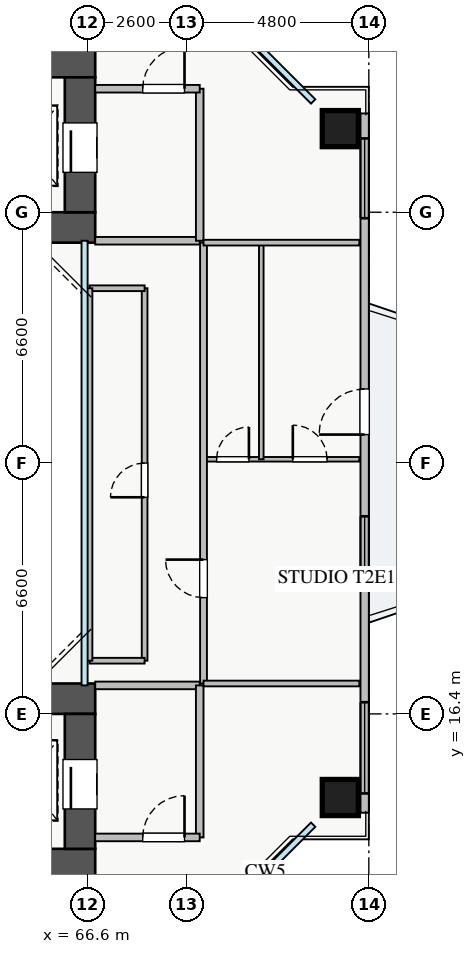
"""IFC4 building model, lengths in metres.
Left out: names, types, materials, properties, quantities, classifications, styles, units other than length and angle.
Written with IfcOpenShell. Run it as: python <this file> out.ifc"""

import sys

from ifc_helpers import new_model, si_unit, direction, frame, frame_2d, origin, origin_2d, place, context, subcontext, project, spatial, rectangle, extrude, source, transform, mapped, element, fill, save


model = new_model("IFC4")
c1 = context("Model", 3, precision=1e-05, world=origin(), true_north=direction((0.0, 1.0)))
c2 = subcontext(c1, "Body", "Model", "MODEL_VIEW")
j1 = project(units=[si_unit("LENGTHUNIT", "METRE"), si_unit("PLANEANGLEUNIT", "RADIAN")], contexts=[c1])
p1 = place(None, origin())
s1 = spatial("IfcSite", under=j1, at=p1, CompositionType="ELEMENT")
p2 = place(p1, origin())
s2 = spatial("IfcBuilding", under=s1, at=p2, CompositionType="ELEMENT")
p3 = place(p2, frame((0.0, 0.0, 29.5)))
s3 = spatial("IfcBuildingStorey", under=s2, at=p3, CompositionType="ELEMENT", Elevation=29.5)
p4 = place(p3, frame((54.2, 29.2, 0.0), z_axis=(0.0, 0.0, 1.0), x_axis=(1.0, 0.0, 0.0)))
e1 = element("IfcWall", 1, at=p4, inside=s3, PredefinedType="SHEAR", context=c2, shape_type="SweptSolid", body=[
    extrude(rectangle(XDim=12.6, YDim=0.8, at=frame_2d((6.3, 0.0))), origin(), (0.0, 0.0, 1.0), 3.25),
])
p5 = place(p3, frame((54.2, 33.55, 0.0), z_axis=(0.0, 0.0, 1.0), x_axis=(1.0, 0.0, 0.0)))
e2 = element("IfcWall", 2, at=p5, inside=s3, PredefinedType="SHEAR", context=c2, shape_type="SweptSolid", body=[
    extrude(rectangle(XDim=12.6, YDim=0.8, at=frame_2d((6.3, 0.0))), origin(), (0.0, 0.0, 1.0), 3.25),
])
p6 = place(p5, frame((8.2, 0.0, 0.0)))
e3 = element("IfcOpeningElement", 3, at=p6, cuts=e2, PredefinedType="OPENING", context=c2, shape_type="SweptSolid", body=[
    extrude(rectangle(XDim=1.1, YDim=2.05, at=frame_2d((0.55, 1.025))), frame((0.0, 0.41, 0.0), z_axis=(0.0, -1.0, 0.0), x_axis=(1.0, 0.0, 0.0)), (0.0, 0.0, 1.0), 0.82),
])
p7 = place(p3, frame((66.4, 29.6, 0.0), z_axis=(0.0, 0.0, 1.0), x_axis=(0.0, 1.0, 0.0)))
e4 = element("IfcWall", 4, at=p7, inside=s3, PredefinedType="SHEAR", context=c2, shape_type="SweptSolid", body=[
    extrude(rectangle(XDim=3.55, YDim=0.8, at=frame_2d((1.775, 0.0))), origin(), (0.0, 0.0, 1.0), 3.25),
])
p8 = place(p7, frame((1.05, 0.0, 0.0)))
e5 = element("IfcOpeningElement", 5, at=p8, cuts=e4, PredefinedType="OPENING", context=c2, shape_type="SweptSolid", body=[
    extrude(rectangle(XDim=1.3, YDim=2.05, at=frame_2d((0.65, 1.025))), frame((0.0, 0.41, 0.0), z_axis=(0.0, -1.0, 0.0), x_axis=(1.0, 0.0, 0.0)), (0.0, 0.0, 1.0), 0.82),
])
p9 = place(p3, frame((54.2, 12.45, 0.0), z_axis=(0.0, 0.0, 1.0), x_axis=(1.0, 0.0, 0.0)))
e6 = element("IfcWall", 6, at=p9, inside=s3, PredefinedType="SHEAR", context=c2, shape_type="SweptSolid", body=[
    extrude(rectangle(XDim=12.6, YDim=0.8, at=frame_2d((6.3, 0.0))), origin(), (0.0, 0.0, 1.0), 3.25),
])
p10 = place(p9, frame((8.2, 0.0, 0.0)))
e7 = element("IfcOpeningElement", 7, at=p10, cuts=e6, PredefinedType="OPENING", context=c2, shape_type="SweptSolid", body=[
    extrude(rectangle(XDim=1.1, YDim=2.05, at=frame_2d((0.55, 1.025))), frame((0.0, 0.41, 0.0), z_axis=(0.0, -1.0, 0.0), x_axis=(1.0, 0.0, 0.0)), (0.0, 0.0, 1.0), 0.82),
])
p11 = place(p3, frame((54.2, 16.8, 0.0), z_axis=(0.0, 0.0, 1.0), x_axis=(1.0, 0.0, 0.0)))
e8 = element("IfcWall", 8, at=p11, inside=s3, PredefinedType="SHEAR", context=c2, shape_type="SweptSolid", body=[
    extrude(rectangle(XDim=12.6, YDim=0.8, at=frame_2d((6.3, 0.0))), origin(), (0.0, 0.0, 1.0), 3.25),
])
p12 = place(p3, frame((66.4, 12.85, 0.0), z_axis=(0.0, 0.0, 1.0), x_axis=(0.0, 1.0, 0.0)))
e9 = element("IfcWall", 9, at=p12, inside=s3, PredefinedType="SHEAR", context=c2, shape_type="SweptSolid", body=[
    extrude(rectangle(XDim=3.55, YDim=0.8, at=frame_2d((1.775, 0.0))), origin(), (0.0, 0.0, 1.0), 3.25),
])
p13 = place(p12, frame((1.05, 0.0, 0.0)))
e10 = element("IfcOpeningElement", 10, at=p13, cuts=e9, PredefinedType="OPENING", context=c2, shape_type="SweptSolid", body=[
    extrude(rectangle(XDim=1.3, YDim=2.05, at=frame_2d((0.65, 1.025))), frame((0.0, 0.41, 0.0), z_axis=(0.0, -1.0, 0.0), x_axis=(1.0, 0.0, 0.0)), (0.0, 0.0, 1.0), 0.82),
])
m1 = source(origin(), c2, "Body", "SweptSolid", [
    extrude(rectangle(XDim=0.95, YDim=0.95, at=origin_2d()), origin(), (0.0, 0.0, 1.0), 3.25),
])
for number, where, z_axis, x_axis in (
    (11, (73.25, 14.2, 0.0), (0.0, 0.0, 1.0), (1.0, 0.0, 0.0)),
    (12, (73.25, 31.8, 0.0), (0.0, 0.0, 1.0), (1.0, 0.0, 0.0)),
):
    element("IfcColumn", number, at=place(p3, frame(where, z_axis=z_axis, x_axis=x_axis)), inside=s3, PredefinedType="COLUMN", context=c2, shape_type="MappedRepresentation", body=[
        mapped(m1, transform((0.0, 0.0, 0.0), x_axis=(1.0, 0.0, 0.0), y_axis=(0.0, 1.0, 0.0), z_axis=(0.0, 0.0, 1.0), scale=1.0)),
    ])
p14 = place(p3, frame((73.89, 13.8, 0.0), z_axis=(0.0, 0.0, 1.0), x_axis=(0.0, 1.0, 0.0)))
e13 = element("IfcWall", 13, at=p14, inside=s3, PredefinedType="STANDARD", context=c2, shape_type="SweptSolid", body=[
    extrude(rectangle(XDim=18.4, YDim=0.22, at=frame_2d((9.2, 0.0))), origin(), (0.0, 0.0, 1.0), 2.61),
])
p15 = place(p14, frame((9.95, 0.0, 0.0)))
e14 = element("IfcOpeningElement", 14, at=p15, cuts=e13, PredefinedType="OPENING", context=c2, shape_type="SweptSolid", body=[
    extrude(rectangle(XDim=1.2, YDim=2.1, at=frame_2d((0.6, 1.05))), frame((0.0, 0.12, 0.0), z_axis=(0.0, -1.0, 0.0), x_axis=(1.0, 0.0, 0.0)), (0.0, 0.0, 1.0), 0.24),
])
p16 = place(p14, frame((0.508, 0.0, 0.9)))
e15 = element("IfcOpeningElement", 15, at=p16, cuts=e13, PredefinedType="OPENING", context=c2, shape_type="SweptSolid", body=[
    extrude(rectangle(XDim=2.4, YDim=1.5, at=frame_2d((1.2, 0.75))), frame((0.0, 0.12, 0.0), z_axis=(0.0, -1.0, 0.0), x_axis=(1.0, 0.0, 0.0)), (0.0, 0.0, 1.0), 0.24),
])
p17 = place(p14, frame((6.0, 0.0, 0.9)))
e16 = element("IfcOpeningElement", 16, at=p17, cuts=e13, PredefinedType="OPENING", context=c2, shape_type="SweptSolid", body=[
    extrude(rectangle(XDim=1.8, YDim=1.45, at=frame_2d((0.9, 0.725))), frame((0.0, 0.12, 0.0), z_axis=(0.0, -1.0, 0.0), x_axis=(1.0, 0.0, 0.0)), (0.0, 0.0, 1.0), 0.24),
])
p18 = place(p14, frame((15.643, 0.0, 0.9)))
e17 = element("IfcOpeningElement", 17, at=p18, cuts=e13, PredefinedType="OPENING", context=c2, shape_type="SweptSolid", body=[
    extrude(rectangle(XDim=2.1, YDim=1.5, at=frame_2d((1.05, 0.75))), frame((0.0, 0.12, 0.0), z_axis=(0.0, -1.0, 0.0), x_axis=(1.0, 0.0, 0.0)), (0.0, 0.0, 1.0), 0.24),
])
p19 = place(p3, frame((66.8, 28.85, 0.0), z_axis=(0.0, 0.0, 1.0), x_axis=(1.0, 0.0, 0.0)))
e18 = element("IfcWall", 18, at=p19, inside=s3, PredefinedType="PARTITIONING", context=c2, shape_type="SweptSolid", body=[
    extrude(rectangle(XDim=2.75, YDim=0.2, at=frame_2d((1.375, 0.0))), origin(), (0.0, 0.0, 1.0), 3.07),
])
p20 = place(p3, frame((69.55, 28.85, 0.0), z_axis=(0.0, 0.0, 1.0), x_axis=(0.0, 1.0, 0.0)))
e19 = element("IfcWall", 19, at=p20, inside=s3, PredefinedType="PARTITIONING", context=c2, shape_type="SweptSolid", body=[
    extrude(rectangle(XDim=4.0, YDim=0.2, at=frame_2d((2.0, 0.0))), origin(), (0.0, 0.0, 1.0), 2.615),
])
p21 = place(p3, frame((66.8, 32.85, 0.0), z_axis=(0.0, 0.0, 1.0), x_axis=(1.0, 0.0, 0.0)))
e20 = element("IfcWall", 20, at=p21, inside=s3, PredefinedType="PARTITIONING", context=c2, shape_type="SweptSolid", body=[
    extrude(rectangle(XDim=2.75, YDim=0.2, at=frame_2d((1.375, 0.0))), origin(), (0.0, 0.0, 1.0), 3.07),
])
p22 = place(p21, frame((1.25, 0.0, 0.0)))
e21 = element("IfcOpeningElement", 21, at=p22, cuts=e20, PredefinedType="OPENING", context=c2, shape_type="SweptSolid", body=[
    extrude(rectangle(XDim=1.1, YDim=2.05, at=frame_2d((0.55, 1.025))), frame((0.0, 0.11, 0.0), z_axis=(0.0, -1.0, 0.0), x_axis=(1.0, 0.0, 0.0)), (0.0, 0.0, 1.0), 0.22),
])
p23 = place(p3, frame((66.8, 17.15, 0.0), z_axis=(0.0, 0.0, 1.0), x_axis=(1.0, 0.0, 0.0)))
e22 = element("IfcWall", 22, at=p23, inside=s3, PredefinedType="PARTITIONING", context=c2, shape_type="SweptSolid", body=[
    extrude(rectangle(XDim=2.75, YDim=0.2, at=frame_2d((1.375, 0.0))), origin(), (0.0, 0.0, 1.0), 3.07),
])
p24 = place(p3, frame((69.55, 13.15, 0.0), z_axis=(0.0, 0.0, 1.0), x_axis=(0.0, 1.0, 0.0)))
e23 = element("IfcWall", 23, at=p24, inside=s3, PredefinedType="PARTITIONING", context=c2, shape_type="SweptSolid", body=[
    extrude(rectangle(XDim=4.0, YDim=0.2, at=frame_2d((2.0, 0.0))), origin(), (0.0, 0.0, 1.0), 2.615),
])
p25 = place(p3, frame((66.8, 13.15, 0.0), z_axis=(0.0, 0.0, 1.0), x_axis=(1.0, 0.0, 0.0)))
e24 = element("IfcWall", 24, at=p25, inside=s3, PredefinedType="PARTITIONING", context=c2, shape_type="SweptSolid", body=[
    extrude(rectangle(XDim=2.75, YDim=0.2, at=frame_2d((1.375, 0.0))), origin(), (0.0, 0.0, 1.0), 3.07),
])
p26 = place(p25, frame((1.25, 0.0, 0.0)))
e25 = element("IfcOpeningElement", 25, at=p26, cuts=e24, PredefinedType="OPENING", context=c2, shape_type="SweptSolid", body=[
    extrude(rectangle(XDim=1.1, YDim=2.05, at=frame_2d((0.55, 1.025))), frame((0.0, 0.11, 0.0), z_axis=(0.0, -1.0, 0.0), x_axis=(1.0, 0.0, 0.0)), (0.0, 0.0, 1.0), 0.22),
])
p27 = place(p3, frame((69.65, 23.1, 0.0), z_axis=(0.0, 0.0, 1.0), x_axis=(1.0, 0.0, 0.0)))
e26 = element("IfcWall", 26, at=p27, inside=s3, PredefinedType="PLUMBINGWALL", context=c2, shape_type="SweptSolid", body=[
    extrude(rectangle(XDim=4.1, YDim=0.12, at=frame_2d((2.05, 0.0))), origin(), (0.0, 0.0, 1.0), 2.821),
])
p28 = place(p27, frame((0.345, 0.0, 0.0)))
e27 = element("IfcOpeningElement", 27, at=p28, cuts=e26, PredefinedType="OPENING", context=c2, shape_type="SweptSolid", body=[
    extrude(rectangle(XDim=0.85, YDim=2.05, at=frame_2d((0.425, 1.025))), frame((0.0, 0.07, 0.0), z_axis=(0.0, -1.0, 0.0), x_axis=(1.0, 0.0, 0.0)), (0.0, 0.0, 1.0), 0.14),
])
p29 = place(p27, frame((2.35, 0.0, 0.0)))
e28 = element("IfcOpeningElement", 28, at=p29, cuts=e26, PredefinedType="OPENING", context=c2, shape_type="SweptSolid", body=[
    extrude(rectangle(XDim=0.9, YDim=2.05, at=frame_2d((0.45, 1.025))), frame((0.0, 0.07, 0.0), z_axis=(0.0, -1.0, 0.0), x_axis=(1.0, 0.0, 0.0)), (0.0, 0.0, 1.0), 0.14),
])
p30 = place(p3, frame((71.17, 23.1, 0.0), z_axis=(0.0, 0.0, 1.0), x_axis=(0.0, 1.0, 0.0)))
e29 = element("IfcWall", 29, at=p30, inside=s3, PredefinedType="PLUMBINGWALL", context=c2, shape_type="SweptSolid", body=[
    extrude(rectangle(XDim=5.7, YDim=0.12, at=frame_2d((2.85, 0.0))), origin(), (0.0, 0.0, 1.0), 3.07),
])
p31 = place(p3, frame((69.65, 17.2, 0.0), z_axis=(0.0, 0.0, 1.0), x_axis=(0.0, 1.0, 0.0)))
e30 = element("IfcWall", 30, at=p31, inside=s3, PredefinedType="PARTITIONING", context=c2, shape_type="SweptSolid", body=[
    extrude(rectangle(XDim=11.6, YDim=0.18, at=frame_2d((5.8, 0.0))), origin(), (0.0, 0.0, 1.0), 3.07),
])
p32 = place(p31, frame((2.26, 0.0, 0.0)))
e31 = element("IfcOpeningElement", 31, at=p32, cuts=e30, PredefinedType="OPENING", context=c2, shape_type="SweptSolid", body=[
    extrude(rectangle(XDim=1.0, YDim=2.05, at=frame_2d((0.5, 1.025))), frame((0.0, 0.1, 0.0), z_axis=(0.0, -1.0, 0.0), x_axis=(1.0, 0.0, 0.0)), (0.0, 0.0, 1.0), 0.2),
])
for number, where, z_axis, x_axis in (
    (32, (69.65, 17.2, 0.0), (0.0, 0.0, 1.0), (1.0, 0.0, 0.0)),
    (33, (69.65, 28.8, 0.0), (0.0, 0.0, 1.0), (1.0, 0.0, 0.0)),
):
    element("IfcWall", number, at=place(p3, frame(where, z_axis=z_axis, x_axis=x_axis)), inside=s3, PredefinedType="PARTITIONING", context=c2, shape_type="SweptSolid", body=[
        extrude(rectangle(XDim=4.1, YDim=0.15, at=frame_2d((2.05, 0.0))), origin(), (0.0, 0.0, 1.0), 3.07),
    ])
p33 = place(p3, frame((68.1, 17.8, 0.0), z_axis=(0.0, 0.0, 1.0), x_axis=(0.0, 1.0, 0.0)))
e34 = element("IfcWall", 34, at=p33, inside=s3, PredefinedType="PARTITIONING", context=c2, shape_type="SweptSolid", body=[
    extrude(rectangle(XDim=9.8, YDim=0.15, at=frame_2d((4.9, 0.0))), origin(), (0.0, 0.0, 1.0), 3.07),
])
p34 = place(p33, frame((4.3, 0.0, 0.0)))
e35 = element("IfcOpeningElement", 35, at=p34, cuts=e34, PredefinedType="OPENING", context=c2, shape_type="SweptSolid", body=[
    extrude(rectangle(XDim=0.9, YDim=2.05, at=frame_2d((0.45, 1.025))), frame((0.0, 0.085, 0.0), z_axis=(0.0, -1.0, 0.0), x_axis=(1.0, 0.0, 0.0)), (0.0, 0.0, 1.0), 0.17),
])
p35 = place(p3, frame((66.65, 27.6, 0.0), z_axis=(0.0, 0.0, 1.0), x_axis=(1.0, 0.0, 0.0)))
e36 = element("IfcWall", 36, at=p35, inside=s3, PredefinedType="PARTITIONING", context=c2, shape_type="SweptSolid", body=[
    extrude(rectangle(XDim=1.45, YDim=0.15, at=frame_2d((0.725, 0.0))), origin(), (0.0, 0.0, 1.0), 2.821),
])
p36 = place(p3, frame((66.65, 17.8, 0.0), z_axis=(0.0, 0.0, 1.0), x_axis=(1.0, 0.0, 0.0)))
e37 = element("IfcWall", 37, at=p36, inside=s3, PredefinedType="PARTITIONING", context=c2, shape_type="SweptSolid", body=[
    extrude(rectangle(XDim=1.45, YDim=0.15, at=frame_2d((0.725, 0.0))), origin(), (0.0, 0.0, 1.0), 3.07),
])
p37 = place(p3, frame((66.65, 17.8, 0.0), z_axis=(0.0, 0.0, 1.0), x_axis=(0.0, 1.0, 0.0)))
e38 = element("IfcWall", 38, at=p37, inside=s3, PredefinedType="PARTITIONING", context=c2, shape_type="SweptSolid", body=[
    extrude(rectangle(XDim=9.8, YDim=0.15, at=frame_2d((4.9, 0.0))), origin(), (0.0, 0.0, 1.0), 2.665),
])
m2 = source(origin(), c2, "Body", "SweptSolid", [
    extrude(rectangle(XDim=1.2, YDim=2.1, at=frame_2d((0.6, 1.05))), frame((0.0, 0.025, 0.0), z_axis=(0.0, -1.0, 0.0), x_axis=(1.0, 0.0, 0.0)), (0.0, 0.0, 1.0), 0.05),
])
p38 = place(p15, origin())
e39 = element("IfcDoor", 39, at=p38, inside=s3, OperationType="SINGLE_SWING_LEFT", PredefinedType="DOOR", context=c2, shape_type="MappedRepresentation", body=[
    mapped(m2, transform((0.0, 0.0, 0.0), x_axis=(1.0, 0.0, 0.0), y_axis=(0.0, 1.0, 0.0), z_axis=(0.0, 0.0, 1.0), scale=1.0)),
])
fill(e14, e39)
m3 = source(origin(), c2, "Body", "SweptSolid", [
    extrude(rectangle(XDim=2.4, YDim=1.5, at=frame_2d((1.2, 0.75))), frame((0.0, 0.03, 0.0), z_axis=(0.0, -1.0, 0.0), x_axis=(1.0, 0.0, 0.0)), (0.0, 0.0, 1.0), 0.06),
])
p39 = place(p16, origin())
e40 = element("IfcWindow", 40, at=p39, inside=s3, PartitioningType="TRIPLE_PANEL_VERTICAL", PredefinedType="WINDOW", context=c2, shape_type="MappedRepresentation", body=[
    mapped(m3, transform((0.0, 0.0, 0.0), x_axis=(1.0, 0.0, 0.0), y_axis=(0.0, 1.0, 0.0), z_axis=(0.0, 0.0, 1.0), scale=1.0)),
])
fill(e15, e40)
m4 = source(origin(), c2, "Body", "SweptSolid", [
    extrude(rectangle(XDim=1.8, YDim=1.45, at=frame_2d((0.9, 0.725))), frame((0.0, 0.03, 0.0), z_axis=(0.0, -1.0, 0.0), x_axis=(1.0, 0.0, 0.0)), (0.0, 0.0, 1.0), 0.06),
])
p40 = place(p17, origin())
e41 = element("IfcWindow", 41, at=p40, inside=s3, PartitioningType="DOUBLE_PANEL_VERTICAL", PredefinedType="WINDOW", context=c2, shape_type="MappedRepresentation", body=[
    mapped(m4, transform((0.0, 0.0, 0.0), x_axis=(1.0, 0.0, 0.0), y_axis=(0.0, 1.0, 0.0), z_axis=(0.0, 0.0, 1.0), scale=1.0)),
])
fill(e16, e41)
m5 = source(origin(), c2, "Body", "SweptSolid", [
    extrude(rectangle(XDim=2.1, YDim=1.5, at=frame_2d((1.05, 0.75))), frame((0.0, 0.03, 0.0), z_axis=(0.0, -1.0, 0.0), x_axis=(1.0, 0.0, 0.0)), (0.0, 0.0, 1.0), 0.06),
])
p41 = place(p18, origin())
e42 = element("IfcWindow", 42, at=p41, inside=s3, PartitioningType="TRIPLE_PANEL_VERTICAL", PredefinedType="WINDOW", context=c2, shape_type="MappedRepresentation", body=[
    mapped(m5, transform((0.0, 0.0, 0.0), x_axis=(1.0, 0.0, 0.0), y_axis=(0.0, 1.0, 0.0), z_axis=(0.0, 0.0, 1.0), scale=1.0)),
])
fill(e17, e42)
m6 = source(origin(), c2, "Body", "SweptSolid", [
    extrude(rectangle(XDim=1.3, YDim=2.05, at=frame_2d((0.65, 1.025))), frame((0.0, 0.025, 0.0), z_axis=(0.0, -1.0, 0.0), x_axis=(1.0, 0.0, 0.0)), (0.0, 0.0, 1.0), 0.05),
])
p42 = place(p8, origin())
e43 = element("IfcDoor", 43, at=p42, inside=s3, OperationType="SLIDING_TO_LEFT", PredefinedType="DOOR", context=c2, shape_type="MappedRepresentation", body=[
    mapped(m6, transform((0.0, 0.0, 0.0), x_axis=(1.0, 0.0, 0.0), y_axis=(0.0, 1.0, 0.0), z_axis=(0.0, 0.0, 1.0), scale=1.0)),
])
fill(e5, e43)
p43 = place(p13, origin())
e44 = element("IfcDoor", 44, at=p43, inside=s3, OperationType="SLIDING_TO_RIGHT", PredefinedType="DOOR", context=c2, shape_type="MappedRepresentation", body=[
    mapped(m6, transform((0.0, 0.0, 0.0), x_axis=(1.0, 0.0, 0.0), y_axis=(0.0, 1.0, 0.0), z_axis=(0.0, 0.0, 1.0), scale=1.0)),
])
fill(e10, e44)
m7 = source(origin(), c2, "Body", "SweptSolid", [
    extrude(rectangle(XDim=1.1, YDim=2.05, at=frame_2d((0.55, 1.025))), frame((0.0, 0.025, 0.0), z_axis=(0.0, -1.0, 0.0), x_axis=(1.0, 0.0, 0.0)), (0.0, 0.0, 1.0), 0.05),
])
p44 = place(p22, origin())
e45 = element("IfcDoor", 45, at=p44, inside=s3, OperationType="SINGLE_SWING_RIGHT", PredefinedType="DOOR", context=c2, shape_type="MappedRepresentation", body=[
    mapped(m7, transform((0.0, 0.0, 0.0), x_axis=(1.0, 0.0, 0.0), y_axis=(0.0, 1.0, 0.0), z_axis=(0.0, 0.0, 1.0), scale=1.0)),
])
fill(e21, e45)
p45 = place(p26, origin())
e46 = element("IfcDoor", 46, at=p45, inside=s3, OperationType="SINGLE_SWING_RIGHT", PredefinedType="DOOR", context=c2, shape_type="MappedRepresentation", body=[
    mapped(m7, transform((0.0, 0.0, 0.0), x_axis=(1.0, 0.0, 0.0), y_axis=(0.0, 1.0, 0.0), z_axis=(0.0, 0.0, 1.0), scale=1.0)),
])
fill(e25, e46)
m8 = source(origin(), c2, "Body", "SweptSolid", [
    extrude(rectangle(XDim=0.85, YDim=2.05, at=frame_2d((0.425, 1.025))), frame((0.0, 0.025, 0.0), z_axis=(0.0, -1.0, 0.0), x_axis=(1.0, 0.0, 0.0)), (0.0, 0.0, 1.0), 0.05),
])
p46 = place(p28, origin())
e47 = element("IfcDoor", 47, at=p46, inside=s3, OperationType="SINGLE_SWING_RIGHT", PredefinedType="DOOR", context=c2, shape_type="MappedRepresentation", body=[
    mapped(m8, transform((0.0, 0.0, 0.0), x_axis=(1.0, 0.0, 0.0), y_axis=(0.0, 1.0, 0.0), z_axis=(0.0, 0.0, 1.0), scale=1.0)),
])
fill(e27, e47)
m9 = source(origin(), c2, "Body", "SweptSolid", [
    extrude(rectangle(XDim=0.9, YDim=2.05, at=frame_2d((0.45, 1.025))), frame((0.0, 0.025, 0.0), z_axis=(0.0, -1.0, 0.0), x_axis=(1.0, 0.0, 0.0)), (0.0, 0.0, 1.0), 0.05),
])
p47 = place(p29, origin())
e48 = element("IfcDoor", 48, at=p47, inside=s3, OperationType="SINGLE_SWING_LEFT", PredefinedType="DOOR", context=c2, shape_type="MappedRepresentation", body=[
    mapped(m9, transform((0.0, 0.0, 0.0), x_axis=(1.0, 0.0, 0.0), y_axis=(0.0, 1.0, 0.0), z_axis=(0.0, 0.0, 1.0), scale=1.0)),
])
fill(e28, e48)
m10 = source(origin(), c2, "Body", "SweptSolid", [
    extrude(rectangle(XDim=1.0, YDim=2.05, at=frame_2d((0.5, 1.025))), frame((0.0, 0.025, 0.0), z_axis=(0.0, -1.0, 0.0), x_axis=(1.0, 0.0, 0.0)), (0.0, 0.0, 1.0), 0.05),
])
p48 = place(p32, origin())
e49 = element("IfcDoor", 49, at=p48, inside=s3, OperationType="SINGLE_SWING_RIGHT", PredefinedType="DOOR", context=c2, shape_type="MappedRepresentation", body=[
    mapped(m10, transform((0.0, 0.0, 0.0), x_axis=(1.0, 0.0, 0.0), y_axis=(0.0, 1.0, 0.0), z_axis=(0.0, 0.0, 1.0), scale=1.0)),
])
fill(e31, e49)
p49 = place(p34, origin())
e50 = element("IfcDoor", 50, at=p49, inside=s3, OperationType="SINGLE_SWING_LEFT", PredefinedType="DOOR", context=c2, shape_type="MappedRepresentation", body=[
    mapped(m9, transform((0.0, 0.0, 0.0), x_axis=(1.0, 0.0, 0.0), y_axis=(0.0, 1.0, 0.0), z_axis=(0.0, 0.0, 1.0), scale=1.0)),
])
fill(e35, e50)
save(model, sys.argv[1])
